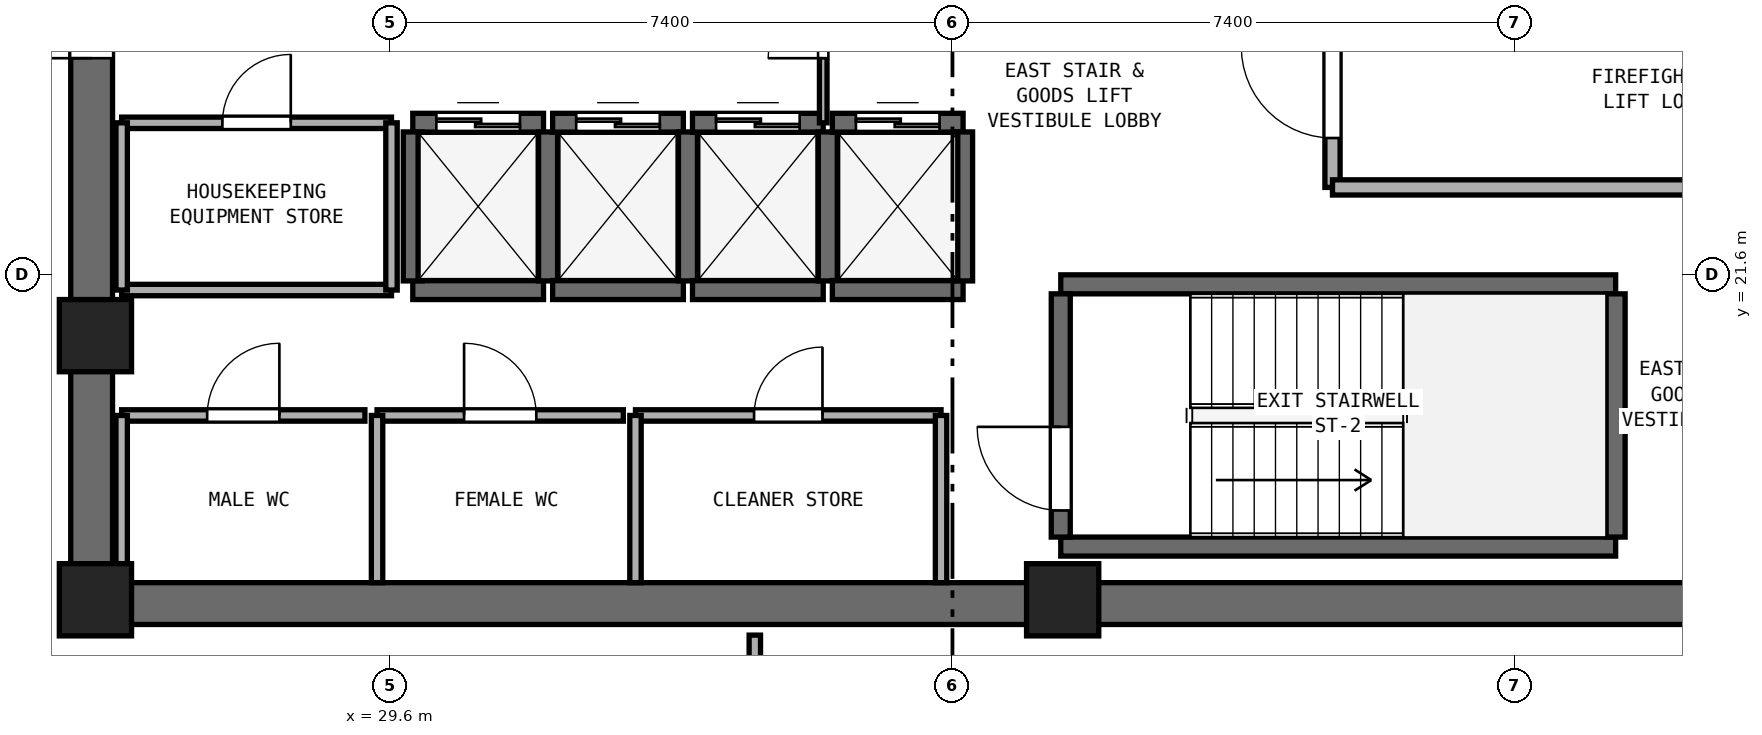
"""IFC4 building model, lengths in metres.
Left out: names, types, materials, properties, quantities, classifications, styles, units other than length and angle.
Written with IfcOpenShell. Run it as: python <this file> out.ifc"""

import sys

from ifc_helpers import new_model, si_unit, direction, frame, frame_2d, origin, origin_2d, place, context, subcontext, project, spatial, rectangle, extrude, element, fill, save


model = new_model("IFC4")
c1 = context("Model", 3, precision=1e-05, world=origin(), true_north=direction((0.0, 1.0)))
c2 = subcontext(c1, "Body", "Model", "MODEL_VIEW")
j1 = project(units=[si_unit("LENGTHUNIT", "METRE"), si_unit("PLANEANGLEUNIT", "RADIAN")], contexts=[c1])
p1 = place(None, origin())
s1 = spatial("IfcSite", under=j1, at=p1, CompositionType="ELEMENT")
p2 = place(p1, origin())
s2 = spatial("IfcBuilding", under=s1, at=p2, CompositionType="ELEMENT")
p3 = place(p2, frame((0.0, 0.0, 125.0)))
s3 = spatial("IfcBuildingStorey", under=s2, at=p3, CompositionType="ELEMENT", Elevation=125.0)
p4 = place(p3, frame((25.4, 17.275, 0.0), z_axis=(0.0, 0.0, 1.0), x_axis=(1.0, 0.0, 0.0)))
e1 = element("IfcWall", 1, at=p4, inside=s3, PredefinedType="SHEAR", context=c2, shape_type="SweptSolid", body=[
    extrude(rectangle(XDim=23.2, YDim=0.55, at=frame_2d((11.6, 0.0))), origin(), (0.0, 0.0, 1.0), 3.54),
])
p5 = place(p3, frame((25.675, 17.55, 0.0), z_axis=(0.0, 0.0, 1.0), x_axis=(0.0, 1.0, 0.0)))
e2 = element("IfcWall", 2, at=p5, inside=s3, PredefinedType="SHEAR", context=c2, shape_type="SweptSolid", body=[
    extrude(rectangle(XDim=15.3, YDim=0.55, at=frame_2d((7.65, 0.0))), origin(), (0.0, 0.0, 1.0), 3.54),
])
p6 = place(p5, frame((6.9, 0.0, 0.0)))
e3 = element("IfcOpeningElement", 3, at=p6, cuts=e2, PredefinedType="OPENING", context=c2, shape_type="SweptSolid", body=[
    extrude(rectangle(XDim=1.5, YDim=2.15, at=frame_2d((0.75, 1.075))), frame((0.0, 0.285, 0.0), z_axis=(0.0, -1.0, 0.0), x_axis=(1.0, 0.0, 0.0)), (0.0, 0.0, 1.0), 0.57),
])
for number, where, z_axis, x_axis in (
    (4, (25.725, 17.325, 0.0), (0.0, 0.0, 1.0), (1.0, 0.0, 0.0)),
    (5, (38.45, 17.325, 0.0), (0.0, 0.0, 1.0), (1.0, 0.0, 0.0)),
    (6, (25.725, 20.8, 0.0), (0.0, 0.0, 1.0), (1.0, 0.0, 0.0)),
):
    element("IfcColumn", number, at=place(p3, frame(where, z_axis=z_axis, x_axis=x_axis)), inside=s3, PredefinedType="PILASTER", context=c2, shape_type="SweptSolid", body=[
        extrude(rectangle(XDim=0.95, YDim=0.95, at=origin_2d()), origin(), (0.0, 0.0, 1.0), 3.8),
    ])
for number, where, z_axis, x_axis in (
    (7, (38.425, 18.025, 0.0), (0.0, 0.0, 1.0), (1.0, 0.0, 0.0)),
    (8, (38.425, 21.475, 0.0), (0.0, 0.0, 1.0), (1.0, 0.0, 0.0)),
):
    element("IfcWall", number, at=place(p3, frame(where, z_axis=z_axis, x_axis=x_axis)), inside=s3, PredefinedType="SHEAR", context=c2, shape_type="SweptSolid", body=[
        extrude(rectangle(XDim=7.3, YDim=0.25, at=frame_2d((3.65, 0.0))), origin(), (0.0, 0.0, 1.0), 3.54),
    ])
p7 = place(p3, frame((38.425, 18.15, 0.0), z_axis=(0.0, 0.0, 1.0), x_axis=(0.0, 1.0, 0.0)))
e9 = element("IfcWall", 9, at=p7, inside=s3, PredefinedType="SHEAR", context=c2, shape_type="SweptSolid", body=[
    extrude(rectangle(XDim=3.2, YDim=0.25, at=frame_2d((1.6, 0.0))), origin(), (0.0, 0.0, 1.0), 3.54),
])
p8 = place(p7, frame((0.35, 0.0, 0.0)))
e10 = element("IfcOpeningElement", 10, at=p8, cuts=e9, PredefinedType="OPENING", context=c2, shape_type="SweptSolid", body=[
    extrude(rectangle(XDim=1.1, YDim=2.15, at=frame_2d((0.55, 1.075))), frame((0.0, 0.135, 0.0), z_axis=(0.0, -1.0, 0.0), x_axis=(1.0, 0.0, 0.0)), (0.0, 0.0, 1.0), 0.27),
])
p9 = place(p3, frame((45.725, 18.15, 0.0), z_axis=(0.0, 0.0, 1.0), x_axis=(0.0, 1.0, 0.0)))
e11 = element("IfcWall", 11, at=p9, inside=s3, PredefinedType="SHEAR", context=c2, shape_type="SweptSolid", body=[
    extrude(rectangle(XDim=3.2, YDim=0.25, at=frame_2d((1.6, 0.0))), origin(), (0.0, 0.0, 1.0), 3.54),
])
p10 = place(p3, frame((29.9, 21.4, 0.0), z_axis=(0.0, 0.0, 1.0), x_axis=(1.0, 0.0, 0.0)))
e12 = element("IfcWall", 12, at=p10, inside=s3, PredefinedType="SHEAR", context=c2, shape_type="SweptSolid", body=[
    extrude(rectangle(XDim=1.72, YDim=0.25, at=frame_2d((0.86, 0.0))), origin(), (0.0, 0.0, 1.0), 3.54),
])
p11 = place(p3, frame((29.9, 23.6, 0.0), z_axis=(0.0, 0.0, 1.0), x_axis=(1.0, 0.0, 0.0)))
e13 = element("IfcWall", 13, at=p11, inside=s3, PredefinedType="SHEAR", context=c2, shape_type="SweptSolid", body=[
    extrude(rectangle(XDim=1.72, YDim=0.25, at=frame_2d((0.86, 0.0))), origin(), (0.0, 0.0, 1.0), 3.54),
])
p12 = place(p11, frame((0.31, 0.0, 0.0)))
e14 = element("IfcOpeningElement", 14, at=p12, cuts=e13, PredefinedType="OPENING", context=c2, shape_type="SweptSolid", body=[
    extrude(rectangle(XDim=1.1, YDim=2.15, at=frame_2d((0.55, 1.075))), frame((0.0, 0.135, 0.0), z_axis=(0.0, -1.0, 0.0), x_axis=(1.0, 0.0, 0.0)), (0.0, 0.0, 1.0), 0.27),
])
for number, where, z_axis, x_axis in (
    (15, (29.9, 21.52, 0.0), (0.0, 0.0, 1.0), (0.0, 1.0, 0.0)),
    (16, (31.68, 21.52, 0.0), (0.0, 0.0, 1.0), (0.0, 1.0, 0.0)),
):
    element("IfcWall", number, at=place(p3, frame(where, z_axis=z_axis, x_axis=x_axis)), inside=s3, PredefinedType="SHEAR", context=c2, shape_type="SweptSolid", body=[
        extrude(rectangle(XDim=1.96, YDim=0.25, at=frame_2d((0.98, 0.0))), origin(), (0.0, 0.0, 1.0), 3.54),
    ])
p13 = place(p3, frame((31.74, 21.4, 0.0), z_axis=(0.0, 0.0, 1.0), x_axis=(1.0, 0.0, 0.0)))
e17 = element("IfcWall", 17, at=p13, inside=s3, PredefinedType="SHEAR", context=c2, shape_type="SweptSolid", body=[
    extrude(rectangle(XDim=1.72, YDim=0.25, at=frame_2d((0.86, 0.0))), origin(), (0.0, 0.0, 1.0), 3.54),
])
p14 = place(p3, frame((31.74, 23.6, 0.0), z_axis=(0.0, 0.0, 1.0), x_axis=(1.0, 0.0, 0.0)))
e18 = element("IfcWall", 18, at=p14, inside=s3, PredefinedType="SHEAR", context=c2, shape_type="SweptSolid", body=[
    extrude(rectangle(XDim=1.72, YDim=0.25, at=frame_2d((0.86, 0.0))), origin(), (0.0, 0.0, 1.0), 3.54),
])
p15 = place(p14, frame((0.31, 0.0, 0.0)))
e19 = element("IfcOpeningElement", 19, at=p15, cuts=e18, PredefinedType="OPENING", context=c2, shape_type="SweptSolid", body=[
    extrude(rectangle(XDim=1.1, YDim=2.15, at=frame_2d((0.55, 1.075))), frame((0.0, 0.135, 0.0), z_axis=(0.0, -1.0, 0.0), x_axis=(1.0, 0.0, 0.0)), (0.0, 0.0, 1.0), 0.27),
])
p16 = place(p3, frame((33.52, 21.52, 0.0), z_axis=(0.0, 0.0, 1.0), x_axis=(0.0, 1.0, 0.0)))
e20 = element("IfcWall", 20, at=p16, inside=s3, PredefinedType="SHEAR", context=c2, shape_type="SweptSolid", body=[
    extrude(rectangle(XDim=1.96, YDim=0.25, at=frame_2d((0.98, 0.0))), origin(), (0.0, 0.0, 1.0), 3.54),
])
p17 = place(p3, frame((33.58, 21.4, 0.0), z_axis=(0.0, 0.0, 1.0), x_axis=(1.0, 0.0, 0.0)))
e21 = element("IfcWall", 21, at=p17, inside=s3, PredefinedType="SHEAR", context=c2, shape_type="SweptSolid", body=[
    extrude(rectangle(XDim=1.72, YDim=0.25, at=frame_2d((0.86, 0.0))), origin(), (0.0, 0.0, 1.0), 3.54),
])
p18 = place(p3, frame((33.58, 23.6, 0.0), z_axis=(0.0, 0.0, 1.0), x_axis=(1.0, 0.0, 0.0)))
e22 = element("IfcWall", 22, at=p18, inside=s3, PredefinedType="SHEAR", context=c2, shape_type="SweptSolid", body=[
    extrude(rectangle(XDim=1.72, YDim=0.25, at=frame_2d((0.86, 0.0))), origin(), (0.0, 0.0, 1.0), 3.54),
])
p19 = place(p18, frame((0.31, 0.0, 0.0)))
e23 = element("IfcOpeningElement", 23, at=p19, cuts=e22, PredefinedType="OPENING", context=c2, shape_type="SweptSolid", body=[
    extrude(rectangle(XDim=1.1, YDim=2.15, at=frame_2d((0.55, 1.075))), frame((0.0, 0.135, 0.0), z_axis=(0.0, -1.0, 0.0), x_axis=(1.0, 0.0, 0.0)), (0.0, 0.0, 1.0), 0.27),
])
p20 = place(p3, frame((35.36, 21.52, 0.0), z_axis=(0.0, 0.0, 1.0), x_axis=(0.0, 1.0, 0.0)))
e24 = element("IfcWall", 24, at=p20, inside=s3, PredefinedType="SHEAR", context=c2, shape_type="SweptSolid", body=[
    extrude(rectangle(XDim=1.96, YDim=0.25, at=frame_2d((0.98, 0.0))), origin(), (0.0, 0.0, 1.0), 3.54),
])
p21 = place(p3, frame((35.42, 21.4, 0.0), z_axis=(0.0, 0.0, 1.0), x_axis=(1.0, 0.0, 0.0)))
e25 = element("IfcWall", 25, at=p21, inside=s3, PredefinedType="SHEAR", context=c2, shape_type="SweptSolid", body=[
    extrude(rectangle(XDim=1.72, YDim=0.25, at=frame_2d((0.86, 0.0))), origin(), (0.0, 0.0, 1.0), 3.54),
])
p22 = place(p3, frame((35.42, 23.6, 0.0), z_axis=(0.0, 0.0, 1.0), x_axis=(1.0, 0.0, 0.0)))
e26 = element("IfcWall", 26, at=p22, inside=s3, PredefinedType="SHEAR", context=c2, shape_type="SweptSolid", body=[
    extrude(rectangle(XDim=1.72, YDim=0.25, at=frame_2d((0.86, 0.0))), origin(), (0.0, 0.0, 1.0), 3.54),
])
p23 = place(p22, frame((0.31, 0.0, 0.0)))
e27 = element("IfcOpeningElement", 27, at=p23, cuts=e26, PredefinedType="OPENING", context=c2, shape_type="SweptSolid", body=[
    extrude(rectangle(XDim=1.1, YDim=2.15, at=frame_2d((0.55, 1.075))), frame((0.0, 0.135, 0.0), z_axis=(0.0, -1.0, 0.0), x_axis=(1.0, 0.0, 0.0)), (0.0, 0.0, 1.0), 0.27),
])
p24 = place(p3, frame((37.14, 21.52, 0.0), z_axis=(0.0, 0.0, 1.0), x_axis=(0.0, 1.0, 0.0)))
e28 = element("IfcWall", 28, at=p24, inside=s3, PredefinedType="SHEAR", context=c2, shape_type="SweptSolid", body=[
    extrude(rectangle(XDim=1.96, YDim=0.25, at=frame_2d((0.98, 0.0))), origin(), (0.0, 0.0, 1.0), 3.54),
])
p25 = place(p3, frame((42.0, 22.75, 0.0), z_axis=(0.0, 0.0, 1.0), x_axis=(0.0, 1.0, 0.0)))
e29 = element("IfcWall", 29, at=p25, inside=s3, PredefinedType="SOLIDWALL", context=c2, shape_type="SweptSolid", body=[
    extrude(rectangle(XDim=6.05, YDim=0.2, at=frame_2d((3.025, 0.0))), origin(), (0.0, 0.0, 1.0), 3.54),
])
p26 = place(p25, frame((0.65, 0.0, 0.0)))
e30 = element("IfcOpeningElement", 30, at=p26, cuts=e29, PredefinedType="OPENING", context=c2, shape_type="SweptSolid", body=[
    extrude(rectangle(XDim=1.2, YDim=2.15, at=frame_2d((0.6, 1.075))), frame((0.0, 0.11, 0.0), z_axis=(0.0, -1.0, 0.0), x_axis=(1.0, 0.0, 0.0)), (0.0, 0.0, 1.0), 0.22),
])
p27 = place(p3, frame((42.0, 22.75, 0.0), z_axis=(0.0, 0.0, 1.0), x_axis=(1.0, 0.0, 0.0)))
e31 = element("IfcWall", 31, at=p27, inside=s3, PredefinedType="SOLIDWALL", context=c2, shape_type="SweptSolid", body=[
    extrude(rectangle(XDim=6.05, YDim=0.2, at=frame_2d((3.025, 0.0))), origin(), (0.0, 0.0, 1.0), 3.54),
])
p28 = place(p3, frame((26.07, 19.75, 0.0), z_axis=(0.0, 0.0, 1.0), x_axis=(1.0, 0.0, 0.0)))
e32 = element("IfcWall", 32, at=p28, inside=s3, PredefinedType="PARTITIONING", context=c2, shape_type="SweptSolid", body=[
    extrude(rectangle(XDim=3.2, YDim=0.15, at=frame_2d((1.6, 0.0))), origin(), (0.0, 0.0, 1.0), 3.54),
])
p29 = place(p28, frame((1.125, 0.0, 0.0)))
e33 = element("IfcOpeningElement", 33, at=p29, cuts=e32, PredefinedType="OPENING", context=c2, shape_type="SweptSolid", body=[
    extrude(rectangle(XDim=0.95, YDim=2.1, at=frame_2d((0.475, 1.05))), frame((0.0, 0.085, 0.0), z_axis=(0.0, -1.0, 0.0), x_axis=(1.0, 0.0, 0.0)), (0.0, 0.0, 1.0), 0.17),
])
p30 = place(p3, frame((26.07, 17.55, 0.0), z_axis=(0.0, 0.0, 1.0), x_axis=(0.0, 1.0, 0.0)))
e34 = element("IfcWall", 34, at=p30, inside=s3, PredefinedType="PARTITIONING", context=c2, shape_type="SweptSolid", body=[
    extrude(rectangle(XDim=2.2, YDim=0.15, at=frame_2d((1.1, 0.0))), origin(), (0.0, 0.0, 1.0), 2.64),
])
p31 = place(p3, frame((29.43, 19.75, 0.0), z_axis=(0.0, 0.0, 1.0), x_axis=(1.0, 0.0, 0.0)))
e35 = element("IfcWall", 35, at=p31, inside=s3, PredefinedType="PARTITIONING", context=c2, shape_type="SweptSolid", body=[
    extrude(rectangle(XDim=3.24, YDim=0.15, at=frame_2d((1.62, 0.0))), origin(), (0.0, 0.0, 1.0), 3.54),
])
p32 = place(p31, frame((1.145, 0.0, 0.0)))
e36 = element("IfcOpeningElement", 36, at=p32, cuts=e35, PredefinedType="OPENING", context=c2, shape_type="SweptSolid", body=[
    extrude(rectangle(XDim=0.95, YDim=2.1, at=frame_2d((0.475, 1.05))), frame((0.0, 0.085, 0.0), z_axis=(0.0, -1.0, 0.0), x_axis=(1.0, 0.0, 0.0)), (0.0, 0.0, 1.0), 0.17),
])
p33 = place(p3, frame((29.43, 17.55, 0.0), z_axis=(0.0, 0.0, 1.0), x_axis=(0.0, 1.0, 0.0)))
e37 = element("IfcWall", 37, at=p33, inside=s3, PredefinedType="PARTITIONING", context=c2, shape_type="SweptSolid", body=[
    extrude(rectangle(XDim=2.2, YDim=0.15, at=frame_2d((1.1, 0.0))), origin(), (0.0, 0.0, 1.0), 3.54),
])
p34 = place(p3, frame((32.83, 19.75, 0.0), z_axis=(0.0, 0.0, 1.0), x_axis=(1.0, 0.0, 0.0)))
e38 = element("IfcWall", 38, at=p34, inside=s3, PredefinedType="PARTITIONING", context=c2, shape_type="SweptSolid", body=[
    extrude(rectangle(XDim=4.02, YDim=0.15, at=frame_2d((2.01, 0.0))), origin(), (0.0, 0.0, 1.0), 3.54),
])
p35 = place(p34, frame((1.56, 0.0, 0.0)))
e39 = element("IfcOpeningElement", 39, at=p35, cuts=e38, PredefinedType="OPENING", context=c2, shape_type="SweptSolid", body=[
    extrude(rectangle(XDim=0.9, YDim=2.1, at=frame_2d((0.45, 1.05))), frame((0.0, 0.085, 0.0), z_axis=(0.0, -1.0, 0.0), x_axis=(1.0, 0.0, 0.0)), (0.0, 0.0, 1.0), 0.17),
])
for number, where, z_axis, x_axis in (
    (40, (32.83, 17.55, 0.0), (0.0, 0.0, 1.0), (0.0, 1.0, 0.0)),
    (41, (36.85, 17.55, 0.0), (0.0, 0.0, 1.0), (0.0, 1.0, 0.0)),
):
    element("IfcWall", number, at=place(p3, frame(where, z_axis=z_axis, x_axis=x_axis)), inside=s3, PredefinedType="PARTITIONING", context=c2, shape_type="SweptSolid", body=[
        extrude(rectangle(XDim=2.2, YDim=0.15, at=frame_2d((1.1, 0.0))), origin(), (0.0, 0.0, 1.0), 3.54),
    ])
p36 = place(p3, frame((26.07, 21.4, 0.0), z_axis=(0.0, 0.0, 1.0), x_axis=(1.0, 0.0, 0.0)))
e42 = element("IfcWall", 42, at=p36, inside=s3, PredefinedType="PARTITIONING", context=c2, shape_type="SweptSolid", body=[
    extrude(rectangle(XDim=3.55, YDim=0.15, at=frame_2d((1.775, 0.0))), origin(), (0.0, 0.0, 1.0), 3.54),
])
p37 = place(p3, frame((26.07, 23.6, 0.0), z_axis=(0.0, 0.0, 1.0), x_axis=(1.0, 0.0, 0.0)))
e43 = element("IfcWall", 43, at=p37, inside=s3, PredefinedType="PARTITIONING", context=c2, shape_type="SweptSolid", body=[
    extrude(rectangle(XDim=3.55, YDim=0.15, at=frame_2d((1.775, 0.0))), origin(), (0.0, 0.0, 1.0), 3.54),
])
p38 = place(p37, frame((1.325, 0.0, 0.0)))
e44 = element("IfcOpeningElement", 44, at=p38, cuts=e43, PredefinedType="OPENING", context=c2, shape_type="SweptSolid", body=[
    extrude(rectangle(XDim=0.9, YDim=2.1, at=frame_2d((0.45, 1.05))), frame((0.0, 0.085, 0.0), z_axis=(0.0, -1.0, 0.0), x_axis=(1.0, 0.0, 0.0)), (0.0, 0.0, 1.0), 0.17),
])
p39 = place(p3, frame((26.07, 21.4, 0.0), z_axis=(0.0, 0.0, 1.0), x_axis=(0.0, 1.0, 0.0)))
e45 = element("IfcWall", 45, at=p39, inside=s3, PredefinedType="PARTITIONING", context=c2, shape_type="SweptSolid", body=[
    extrude(rectangle(XDim=2.2, YDim=0.15, at=frame_2d((1.1, 0.0))), origin(), (0.0, 0.0, 1.0), 2.64),
])
p40 = place(p3, frame((29.62, 21.4, 0.0), z_axis=(0.0, 0.0, 1.0), x_axis=(0.0, 1.0, 0.0)))
e46 = element("IfcWall", 46, at=p40, inside=s3, PredefinedType="PARTITIONING", context=c2, shape_type="SweptSolid", body=[
    extrude(rectangle(XDim=2.2, YDim=0.15, at=frame_2d((1.1, 0.0))), origin(), (0.0, 0.0, 1.0), 3.54),
])
p41 = place(p3, frame((35.3, 23.6, 0.0), z_axis=(0.0, 0.0, 1.0), x_axis=(0.0, 1.0, 0.0)))
e47 = element("IfcWall", 47, at=p41, inside=s3, PredefinedType="PARTITIONING", context=c2, shape_type="SweptSolid", body=[
    extrude(rectangle(XDim=3.2, YDim=0.1, at=frame_2d((1.6, 0.0))), origin(), (0.0, 0.0, 1.0), 3.54),
])
p42 = place(p41, frame((0.85, 0.0, 0.0)))
e48 = element("IfcOpeningElement", 48, at=p42, cuts=e47, PredefinedType="OPENING", context=c2, shape_type="SweptSolid", body=[
    extrude(rectangle(XDim=1.45, YDim=2.12, at=frame_2d((0.725, 1.06))), frame((0.0, 0.06, 0.0), z_axis=(0.0, -1.0, 0.0), x_axis=(1.0, 0.0, 0.0)), (0.0, 0.0, 1.0), 0.12),
])
p43 = place(p3, frame((34.4, 15.2, 0.0), z_axis=(0.0, 0.0, 1.0), x_axis=(0.0, 1.0, 0.0)))
e49 = element("IfcWall", 49, at=p43, inside=s3, PredefinedType="PARTITIONING", context=c2, shape_type="SweptSolid", body=[
    extrude(rectangle(XDim=1.66, YDim=0.15, at=frame_2d((0.83, 0.0))), origin(), (0.0, 0.0, 1.0), 3.54),
])
p44 = place(p8, origin())
e50 = element("IfcDoor", 50, at=p44, inside=s3, OperationType="SINGLE_SWING_RIGHT", PredefinedType="DOOR", context=c2, shape_type="SweptSolid", body=[
    extrude(rectangle(XDim=1.1, YDim=2.15, at=frame_2d((0.55, 1.075))), frame((0.0, 0.025, 0.0), z_axis=(0.0, -1.0, 0.0), x_axis=(1.0, 0.0, 0.0)), (0.0, 0.0, 1.0), 0.05),
])
fill(e10, e50)
p45 = place(p12, origin())
e51 = element("IfcDoor", 51, at=p45, inside=s3, OperationType="DOUBLE_DOOR_SLIDING", PredefinedType="DOOR", context=c2, shape_type="SweptSolid", body=[
    extrude(rectangle(XDim=1.1, YDim=2.15, at=frame_2d((0.55, 1.075))), frame((0.0, 0.025, 0.0), z_axis=(0.0, -1.0, 0.0), x_axis=(1.0, 0.0, 0.0)), (0.0, 0.0, 1.0), 0.05),
])
fill(e14, e51)
p46 = place(p15, origin())
e52 = element("IfcDoor", 52, at=p46, inside=s3, OperationType="DOUBLE_DOOR_SLIDING", PredefinedType="DOOR", context=c2, shape_type="SweptSolid", body=[
    extrude(rectangle(XDim=1.1, YDim=2.15, at=frame_2d((0.55, 1.075))), frame((0.0, 0.025, 0.0), z_axis=(0.0, -1.0, 0.0), x_axis=(1.0, 0.0, 0.0)), (0.0, 0.0, 1.0), 0.05),
])
fill(e19, e52)
p47 = place(p19, origin())
e53 = element("IfcDoor", 53, at=p47, inside=s3, OperationType="DOUBLE_DOOR_SLIDING", PredefinedType="DOOR", context=c2, shape_type="SweptSolid", body=[
    extrude(rectangle(XDim=1.1, YDim=2.15, at=frame_2d((0.55, 1.075))), frame((0.0, 0.025, 0.0), z_axis=(0.0, -1.0, 0.0), x_axis=(1.0, 0.0, 0.0)), (0.0, 0.0, 1.0), 0.05),
])
fill(e23, e53)
p48 = place(p23, origin())
e54 = element("IfcDoor", 54, at=p48, inside=s3, OperationType="DOUBLE_DOOR_SLIDING", PredefinedType="DOOR", context=c2, shape_type="SweptSolid", body=[
    extrude(rectangle(XDim=1.1, YDim=2.15, at=frame_2d((0.55, 1.075))), frame((0.0, 0.025, 0.0), z_axis=(0.0, -1.0, 0.0), x_axis=(1.0, 0.0, 0.0)), (0.0, 0.0, 1.0), 0.05),
])
fill(e27, e54)
p49 = place(p26, origin())
e55 = element("IfcDoor", 55, at=p49, inside=s3, OperationType="SINGLE_SWING_RIGHT", PredefinedType="DOOR", context=c2, shape_type="SweptSolid", body=[
    extrude(rectangle(XDim=1.2, YDim=2.15, at=frame_2d((0.6, 1.075))), frame((0.0, 0.025, 0.0), z_axis=(0.0, -1.0, 0.0), x_axis=(1.0, 0.0, 0.0)), (0.0, 0.0, 1.0), 0.05),
])
fill(e30, e55)
p50 = place(p6, origin())
e56 = element("IfcDoor", 56, at=p50, inside=s3, OperationType="DOUBLE_DOOR_SINGLE_SWING", PredefinedType="DOOR", context=c2, shape_type="SweptSolid", body=[
    extrude(rectangle(XDim=1.5, YDim=2.15, at=frame_2d((0.75, 1.075))), frame((0.0, 0.025, 0.0), z_axis=(0.0, -1.0, 0.0), x_axis=(1.0, 0.0, 0.0)), (0.0, 0.0, 1.0), 0.05),
])
fill(e3, e56)
p51 = place(p29, origin())
e57 = element("IfcDoor", 57, at=p51, inside=s3, OperationType="SINGLE_SWING_RIGHT", PredefinedType="DOOR", context=c2, shape_type="SweptSolid", body=[
    extrude(rectangle(XDim=0.95, YDim=2.1, at=frame_2d((0.475, 1.05))), frame((0.0, 0.025, 0.0), z_axis=(0.0, -1.0, 0.0), x_axis=(1.0, 0.0, 0.0)), (0.0, 0.0, 1.0), 0.05),
])
fill(e33, e57)
p52 = place(p32, origin())
e58 = element("IfcDoor", 58, at=p52, inside=s3, OperationType="SINGLE_SWING_LEFT", PredefinedType="DOOR", context=c2, shape_type="SweptSolid", body=[
    extrude(rectangle(XDim=0.95, YDim=2.1, at=frame_2d((0.475, 1.05))), frame((0.0, 0.025, 0.0), z_axis=(0.0, -1.0, 0.0), x_axis=(1.0, 0.0, 0.0)), (0.0, 0.0, 1.0), 0.05),
])
fill(e36, e58)
p53 = place(p35, origin())
e59 = element("IfcDoor", 59, at=p53, inside=s3, OperationType="SINGLE_SWING_RIGHT", PredefinedType="DOOR", context=c2, shape_type="SweptSolid", body=[
    extrude(rectangle(XDim=0.9, YDim=2.1, at=frame_2d((0.45, 1.05))), frame((0.0, 0.025, 0.0), z_axis=(0.0, -1.0, 0.0), x_axis=(1.0, 0.0, 0.0)), (0.0, 0.0, 1.0), 0.05),
])
fill(e39, e59)
p54 = place(p38, origin())
e60 = element("IfcDoor", 60, at=p54, inside=s3, OperationType="SINGLE_SWING_RIGHT", PredefinedType="DOOR", context=c2, shape_type="SweptSolid", body=[
    extrude(rectangle(XDim=0.9, YDim=2.1, at=frame_2d((0.45, 1.05))), frame((0.0, 0.025, 0.0), z_axis=(0.0, -1.0, 0.0), x_axis=(1.0, 0.0, 0.0)), (0.0, 0.0, 1.0), 0.05),
])
fill(e44, e60)
p55 = place(p42, origin())
e61 = element("IfcDoor", 61, at=p55, inside=s3, OperationType="DOUBLE_DOOR_SINGLE_SWING", PredefinedType="DOOR", context=c2, shape_type="SweptSolid", body=[
    extrude(rectangle(XDim=1.45, YDim=2.12, at=frame_2d((0.725, 1.06))), frame((0.0, 0.025, 0.0), z_axis=(0.0, -1.0, 0.0), x_axis=(1.0, 0.0, 0.0)), (0.0, 0.0, 1.0), 0.05),
])
fill(e48, e61)
save(model, sys.argv[1])
